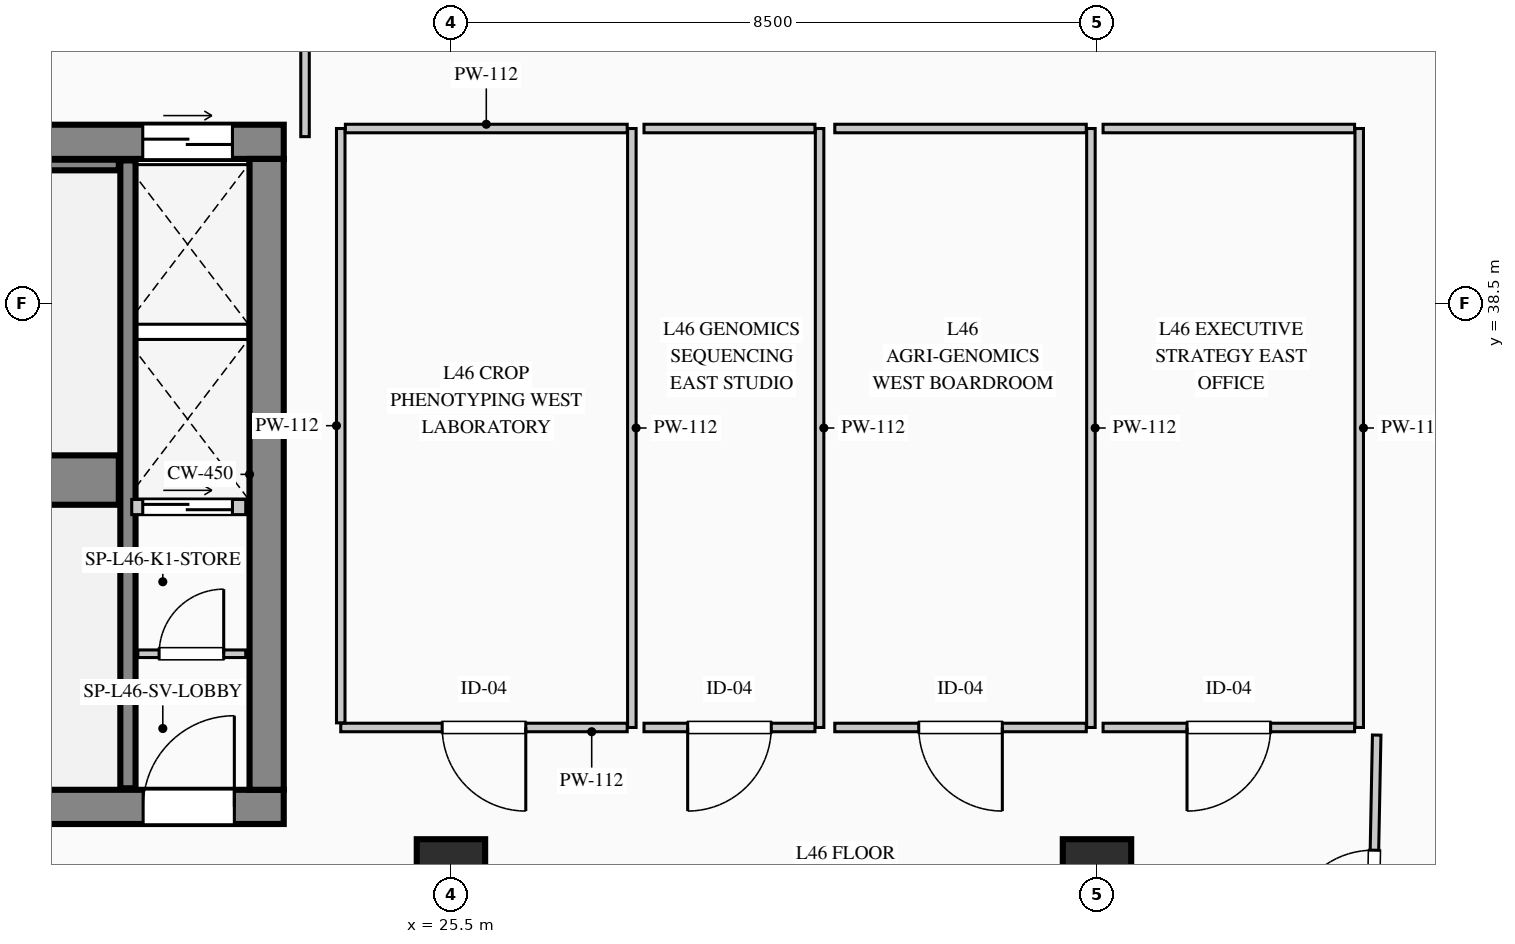
"""IFC4 building model, lengths in metres.
Left out: names, types, materials, properties, quantities, classifications, styles, units other than length and angle.
Written with IfcOpenShell. Run it as: python <this file> out.ifc"""

import sys

from ifc_helpers import new_model, si_unit, direction, frame, frame_2d, origin, origin_2d, place, context, subcontext, project, spatial, rectangle, extrude, element, fill, save


model = new_model("IFC4")
c1 = context("Model", 3, precision=1e-05, world=origin(), true_north=direction((0.0, 1.0)))
c2 = subcontext(c1, "Body", "Model", "MODEL_VIEW")
j1 = project(units=[si_unit("LENGTHUNIT", "METRE"), si_unit("PLANEANGLEUNIT", "RADIAN")], contexts=[c1])
p1 = place(None, origin())
s1 = spatial("IfcSite", under=j1, at=p1, CompositionType="ELEMENT")
p2 = place(p1, origin())
s2 = spatial("IfcBuilding", under=s1, at=p2, CompositionType="ELEMENT")
p3 = place(p2, frame((0.0, 0.0, 195.6)))
s3 = spatial("IfcBuildingStorey", under=s2, at=p3, CompositionType="ELEMENT", Elevation=195.6)
p4 = place(p3, frame((5.55, 40.625, 0.0), z_axis=(0.0, 0.0, 1.0), x_axis=(1.0, 0.0, 0.0)))
e1 = element("IfcWall", 1, at=p4, inside=s3, PredefinedType="SHEAR", context=c2, shape_type="SweptSolid", body=[
    extrude(rectangle(XDim=17.75, YDim=0.45, at=frame_2d((8.875, 0.0))), origin(), (0.0, 0.0, 1.0), 3.95),
])
p5 = place(p4, frame((15.895, 0.0, 0.0)))
e2 = element("IfcOpeningElement", 2, at=p5, cuts=e1, PredefinedType="OPENING", context=c2, shape_type="SweptSolid", body=[
    extrude(rectangle(XDim=1.18, YDim=2.25, at=frame_2d((0.59, 1.125))), frame((0.0, 0.235, 0.0), z_axis=(0.0, -1.0, 0.0), x_axis=(1.0, 0.0, 0.0)), (0.0, 0.0, 1.0), 0.47),
])
p6 = place(p3, frame((5.55, 31.875, 0.0), z_axis=(0.0, 0.0, 1.0), x_axis=(1.0, 0.0, 0.0)))
e3 = element("IfcWall", 3, at=p6, inside=s3, PredefinedType="SHEAR", context=c2, shape_type="SweptSolid", body=[
    extrude(rectangle(XDim=17.75, YDim=0.45, at=frame_2d((8.875, 0.0))), origin(), (0.0, 0.0, 1.0), 3.95),
])
p7 = place(p6, frame((3.1, 0.0, 0.0)))
e4 = element("IfcOpeningElement", 4, at=p7, cuts=e3, PredefinedType="OPENING", context=c2, shape_type="SweptSolid", body=[
    extrude(rectangle(XDim=1.2, YDim=2.2, at=frame_2d((0.6, 1.1))), frame((0.0, 0.235, 0.0), z_axis=(0.0, -1.0, 0.0), x_axis=(1.0, 0.0, 0.0)), (0.0, 0.0, 1.0), 0.47),
])
p8 = place(p6, frame((6.95, 0.0, 0.0)))
e5 = element("IfcOpeningElement", 5, at=p8, cuts=e3, PredefinedType="OPENING", context=c2, shape_type="SweptSolid", body=[
    extrude(rectangle(XDim=1.2, YDim=2.2, at=frame_2d((0.6, 1.1))), frame((0.0, 0.235, 0.0), z_axis=(0.0, -1.0, 0.0), x_axis=(1.0, 0.0, 0.0)), (0.0, 0.0, 1.0), 0.47),
])
p9 = place(p6, frame((8.8, 0.0, 0.0)))
e6 = element("IfcOpeningElement", 6, at=p9, cuts=e3, PredefinedType="OPENING", context=c2, shape_type="SweptSolid", body=[
    extrude(rectangle(XDim=1.15, YDim=2.2, at=frame_2d((0.575, 1.1))), frame((0.0, 0.235, 0.0), z_axis=(0.0, -1.0, 0.0), x_axis=(1.0, 0.0, 0.0)), (0.0, 0.0, 1.0), 0.47),
])
p10 = place(p6, frame((15.9, 0.0, 0.0)))
e7 = element("IfcOpeningElement", 7, at=p10, cuts=e3, PredefinedType="OPENING", context=c2, shape_type="SweptSolid", body=[
    extrude(rectangle(XDim=1.2, YDim=2.2, at=frame_2d((0.6, 1.1))), frame((0.0, 0.235, 0.0), z_axis=(0.0, -1.0, 0.0), x_axis=(1.0, 0.0, 0.0)), (0.0, 0.0, 1.0), 0.47),
])
p11 = place(p3, frame((23.075, 32.1, 0.0), z_axis=(0.0, 0.0, 1.0), x_axis=(0.0, 1.0, 0.0)))
e8 = element("IfcWall", 8, at=p11, inside=s3, PredefinedType="SHEAR", context=c2, shape_type="SweptSolid", body=[
    extrude(rectangle(XDim=8.3, YDim=0.45, at=frame_2d((4.15, 0.0))), origin(), (0.0, 0.0, 1.0), 3.95),
])
p12 = place(p3, frame((14.12, 36.175, 0.0), z_axis=(0.0, 0.0, 1.0), x_axis=(1.0, 0.0, 0.0)))
e9 = element("IfcWall", 9, at=p12, inside=s3, PredefinedType="SHEAR", context=c2, shape_type="SweptSolid", body=[
    extrude(rectangle(XDim=7.01, YDim=0.65, at=frame_2d((3.505, 0.0))), origin(), (0.0, 0.0, 1.0), 3.95),
])
p13 = place(p3, frame((21.25, 32.12, 0.0), z_axis=(0.0, 0.0, 1.0), x_axis=(0.0, 1.0, 0.0)))
e10 = element("IfcWall", 10, at=p13, inside=s3, PredefinedType="SHEAR", context=c2, shape_type="SweptSolid", body=[
    extrude(rectangle(XDim=8.26, YDim=0.2, at=frame_2d((4.13, 0.0))), origin(), (0.0, 0.0, 1.0), 3.95),
])
p14 = place(p3, frame((14.12, 40.32, 0.0), z_axis=(0.0, 0.0, 1.0), x_axis=(1.0, 0.0, 0.0)))
e11 = element("IfcWall", 11, at=p14, inside=s3, PredefinedType="SHEAR", context=c2, shape_type="SweptSolid", body=[
    extrude(rectangle(XDim=7.01, YDim=0.14, at=frame_2d((3.505, 0.0))), origin(), (0.0, 0.0, 1.0), 3.95),
])
for number, where, z_axis, x_axis in (
    (12, (25.5, 31.0, 0.0), (0.0, 0.0, 1.0), (1.0, 0.0, 0.0)),
    (13, (34.0, 31.0, 0.0), (0.0, 0.0, 1.0), (1.0, 0.0, 0.0)),
):
    element("IfcColumn", number, at=place(p3, frame(where, z_axis=z_axis, x_axis=x_axis)), inside=s3, PredefinedType="COLUMN", context=c2, shape_type="SweptSolid", body=[
        extrude(rectangle(XDim=0.9, YDim=0.9, at=origin_2d()), origin(), (0.0, 0.0, 1.0), 3.95),
    ])
p15 = place(p3, frame((21.38, 33.89, 0.0), z_axis=(0.0, 0.0, 1.0), x_axis=(1.0, 0.0, 0.0)))
e14 = element("IfcWall", 14, at=p15, inside=s3, PredefinedType="PARTITIONING", context=c2, shape_type="SweptSolid", body=[
    extrude(rectangle(XDim=1.42, YDim=0.1, at=frame_2d((0.71, 0.0))), origin(), (0.0, 0.0, 1.0), 3.7),
])
p16 = place(p15, frame((0.28, 0.0, 0.0)))
e15 = element("IfcOpeningElement", 15, at=p16, cuts=e14, PredefinedType="OPENING", context=c2, shape_type="SweptSolid", body=[
    extrude(rectangle(XDim=0.85, YDim=2.1, at=frame_2d((0.425, 1.05))), frame((0.0, 0.06, 0.0), z_axis=(0.0, -1.0, 0.0), x_axis=(1.0, 0.0, 0.0)), (0.0, 0.0, 1.0), 0.12),
])
p17 = place(p3, frame((21.3, 35.82, 0.0), z_axis=(0.0, 0.0, 1.0), x_axis=(1.0, 0.0, 0.0)))
e16 = element("IfcWall", 16, at=p17, inside=s3, PredefinedType="PARTITIONING", context=c2, shape_type="SweptSolid", body=[
    extrude(rectangle(XDim=1.5, YDim=0.2, at=frame_2d((0.75, 0.0))), origin(), (0.0, 0.0, 1.0), 3.7),
])
p18 = place(p17, frame((0.145, 0.0, 0.0)))
e17 = element("IfcOpeningElement", 17, at=p18, cuts=e16, PredefinedType="OPENING", context=c2, shape_type="SweptSolid", body=[
    extrude(rectangle(XDim=1.18, YDim=2.25, at=frame_2d((0.59, 1.125))), frame((0.0, 0.11, 0.0), z_axis=(0.0, -1.0, 0.0), x_axis=(1.0, 0.0, 0.0)), (0.0, 0.0, 1.0), 0.22),
])
p19 = place(p3, frame((27.88, 40.8, 0.0), z_axis=(0.0, 0.0, 1.0), x_axis=(0.0, -1.0, 0.0)))
e18 = element("IfcWall", 18, at=p19, inside=s3, PredefinedType="PARTITIONING", context=c2, shape_type="SweptSolid", body=[
    extrude(rectangle(XDim=7.88, YDim=0.112, at=frame_2d((3.94, 0.0))), origin(), (0.0, 0.0, 1.0), 3.7),
])
p20 = place(p3, frame((27.819, 32.92, 0.0), z_axis=(0.0, 0.0, 1.0), x_axis=(-1.0, 0.0, 0.0)))
e19 = element("IfcWall", 19, at=p20, inside=s3, PredefinedType="PARTITIONING", context=c2, shape_type="SweptSolid", body=[
    extrude(rectangle(XDim=3.769, YDim=0.112, at=frame_2d((1.885, 0.0))), origin(), (0.0, 0.0, 1.0), 3.7),
])
p21 = place(p20, frame((1.334, 0.0, 0.0)))
e20 = element("IfcOpeningElement", 20, at=p21, cuts=e19, PredefinedType="OPENING", context=c2, shape_type="SweptSolid", body=[
    extrude(rectangle(XDim=1.1, YDim=2.2, at=frame_2d((0.55, 1.1))), frame((0.0, 0.066, 0.0), z_axis=(0.0, -1.0, 0.0), x_axis=(1.0, 0.0, 0.0)), (0.0, 0.0, 1.0), 0.132),
])
p22 = place(p3, frame((24.05, 32.981, 0.0), z_axis=(0.0, 0.0, 1.0), x_axis=(0.0, 1.0, 0.0)))
e21 = element("IfcWall", 21, at=p22, inside=s3, PredefinedType="PARTITIONING", context=c2, shape_type="SweptSolid", body=[
    extrude(rectangle(XDim=7.819, YDim=0.112, at=frame_2d((3.91, 0.0))), origin(), (0.0, 0.0, 1.0), 3.7),
])
p23 = place(p3, frame((24.111, 40.8, 0.0), z_axis=(0.0, 0.0, 1.0), x_axis=(1.0, 0.0, 0.0)))
e22 = element("IfcWall", 22, at=p23, inside=s3, PredefinedType="PARTITIONING", context=c2, shape_type="SweptSolid", body=[
    extrude(rectangle(XDim=3.708, YDim=0.112, at=frame_2d((1.854, 0.0))), origin(), (0.0, 0.0, 1.0), 3.7),
])
p24 = place(p3, frame((30.35, 40.8, 0.0), z_axis=(0.0, 0.0, 1.0), x_axis=(0.0, -1.0, 0.0)))
e23 = element("IfcWall", 23, at=p24, inside=s3, PredefinedType="PARTITIONING", context=c2, shape_type="SweptSolid", body=[
    extrude(rectangle(XDim=7.88, YDim=0.112, at=frame_2d((3.94, 0.0))), origin(), (0.0, 0.0, 1.0), 3.7),
])
p25 = place(p3, frame((30.289, 32.92, 0.0), z_axis=(0.0, 0.0, 1.0), x_axis=(-1.0, 0.0, 0.0)))
e24 = element("IfcWall", 24, at=p25, inside=s3, PredefinedType="PARTITIONING", context=c2, shape_type="SweptSolid", body=[
    extrude(rectangle(XDim=2.249, YDim=0.112, at=frame_2d((1.125, 0.0))), origin(), (0.0, 0.0, 1.0), 3.7),
])
p26 = place(p25, frame((0.574, 0.0, 0.0)))
e25 = element("IfcOpeningElement", 25, at=p26, cuts=e24, PredefinedType="OPENING", context=c2, shape_type="SweptSolid", body=[
    extrude(rectangle(XDim=1.1, YDim=2.2, at=frame_2d((0.55, 1.1))), frame((0.0, 0.066, 0.0), z_axis=(0.0, -1.0, 0.0), x_axis=(1.0, 0.0, 0.0)), (0.0, 0.0, 1.0), 0.132),
])
p27 = place(p3, frame((28.04, 40.8, 0.0), z_axis=(0.0, 0.0, 1.0), x_axis=(1.0, 0.0, 0.0)))
e26 = element("IfcWall", 26, at=p27, inside=s3, PredefinedType="PARTITIONING", context=c2, shape_type="SweptSolid", body=[
    extrude(rectangle(XDim=2.249, YDim=0.112, at=frame_2d((1.125, 0.0))), origin(), (0.0, 0.0, 1.0), 3.7),
])
p28 = place(p3, frame((33.92, 40.8, 0.0), z_axis=(0.0, 0.0, 1.0), x_axis=(0.0, -1.0, 0.0)))
e27 = element("IfcWall", 27, at=p28, inside=s3, PredefinedType="PARTITIONING", context=c2, shape_type="SweptSolid", body=[
    extrude(rectangle(XDim=7.88, YDim=0.112, at=frame_2d((3.94, 0.0))), origin(), (0.0, 0.0, 1.0), 3.7),
])
p29 = place(p3, frame((33.859, 32.92, 0.0), z_axis=(0.0, 0.0, 1.0), x_axis=(-1.0, 0.0, 0.0)))
e28 = element("IfcWall", 28, at=p29, inside=s3, PredefinedType="PARTITIONING", context=c2, shape_type="SweptSolid", body=[
    extrude(rectangle(XDim=3.309, YDim=0.112, at=frame_2d((1.654, 0.0))), origin(), (0.0, 0.0, 1.0), 3.7),
])
p30 = place(p29, frame((1.104, 0.0, 0.0)))
e29 = element("IfcOpeningElement", 29, at=p30, cuts=e28, PredefinedType="OPENING", context=c2, shape_type="SweptSolid", body=[
    extrude(rectangle(XDim=1.1, YDim=2.2, at=frame_2d((0.55, 1.1))), frame((0.0, 0.066, 0.0), z_axis=(0.0, -1.0, 0.0), x_axis=(1.0, 0.0, 0.0)), (0.0, 0.0, 1.0), 0.132),
])
p31 = place(p3, frame((30.55, 40.8, 0.0), z_axis=(0.0, 0.0, 1.0), x_axis=(1.0, 0.0, 0.0)))
e30 = element("IfcWall", 30, at=p31, inside=s3, PredefinedType="PARTITIONING", context=c2, shape_type="SweptSolid", body=[
    extrude(rectangle(XDim=3.309, YDim=0.112, at=frame_2d((1.654, 0.0))), origin(), (0.0, 0.0, 1.0), 3.7),
])
p32 = place(p3, frame((37.45, 40.8, 0.0), z_axis=(0.0, 0.0, 1.0), x_axis=(0.0, -1.0, 0.0)))
e31 = element("IfcWall", 31, at=p32, inside=s3, PredefinedType="PARTITIONING", context=c2, shape_type="SweptSolid", body=[
    extrude(rectangle(XDim=7.88, YDim=0.112, at=frame_2d((3.94, 0.0))), origin(), (0.0, 0.0, 1.0), 3.7),
])
p33 = place(p3, frame((37.389, 32.92, 0.0), z_axis=(0.0, 0.0, 1.0), x_axis=(-1.0, 0.0, 0.0)))
e32 = element("IfcWall", 32, at=p33, inside=s3, PredefinedType="PARTITIONING", context=c2, shape_type="SweptSolid", body=[
    extrude(rectangle(XDim=3.309, YDim=0.112, at=frame_2d((1.654, 0.0))), origin(), (0.0, 0.0, 1.0), 3.7),
])
p34 = place(p33, frame((1.104, 0.0, 0.0)))
e33 = element("IfcOpeningElement", 33, at=p34, cuts=e32, PredefinedType="OPENING", context=c2, shape_type="SweptSolid", body=[
    extrude(rectangle(XDim=1.1, YDim=2.2, at=frame_2d((0.55, 1.1))), frame((0.0, 0.066, 0.0), z_axis=(0.0, -1.0, 0.0), x_axis=(1.0, 0.0, 0.0)), (0.0, 0.0, 1.0), 0.132),
])
p35 = place(p3, frame((34.08, 40.8, 0.0), z_axis=(0.0, 0.0, 1.0), x_axis=(1.0, 0.0, 0.0)))
e34 = element("IfcWall", 34, at=p35, inside=s3, PredefinedType="PARTITIONING", context=c2, shape_type="SweptSolid", body=[
    extrude(rectangle(XDim=3.309, YDim=0.112, at=frame_2d((1.654, 0.0))), origin(), (0.0, 0.0, 1.0), 3.7),
])
p36 = place(p3, frame((23.58, 40.693, 0.0), z_axis=(0.0, 0.0, 1.0), x_axis=(0.0, 1.0, 0.0)))
e35 = element("IfcWall", 35, at=p36, inside=s3, PredefinedType="PARTITIONING", context=c2, shape_type="SweptSolid", body=[
    extrude(rectangle(XDim=2.542, YDim=0.112, at=frame_2d((1.271, 0.0))), origin(), (0.0, 0.0, 1.0), 3.7),
])
p37 = place(p3, frame((37.599, 28.691, 0.0), z_axis=(0.0, 0.0, 1.0), x_axis=(0.019566997539, 0.999808547977, 0.0)))
e36 = element("IfcWall", 36, at=p37, inside=s3, PredefinedType="PARTITIONING", context=c2, shape_type="SweptSolid", body=[
    extrude(rectangle(XDim=4.13, YDim=0.112, at=frame_2d((2.065, 0.0))), origin(), (0.0, 0.0, 1.0), 3.7),
])
p38 = place(p37, frame((1.515, 0.0, 0.0)))
e37 = element("IfcOpeningElement", 37, at=p38, cuts=e36, PredefinedType="OPENING", context=c2, shape_type="SweptSolid", body=[
    extrude(rectangle(XDim=1.1, YDim=2.2, at=frame_2d((0.55, 1.1))), frame((0.0, 0.066, 0.0), z_axis=(0.0, -1.0, 0.0), x_axis=(1.0, 0.0, 0.0)), (0.0, 0.0, 1.0), 0.132),
])
p39 = place(p10, origin())
e38 = element("IfcDoor", 38, at=p39, inside=s3, OperationType="SINGLE_SWING_RIGHT", PredefinedType="DOOR", context=c2, shape_type="SweptSolid", body=[
    extrude(rectangle(XDim=1.2, YDim=2.2, at=frame_2d((0.6, 1.1))), frame((0.0, 0.025, 0.0), z_axis=(0.0, -1.0, 0.0), x_axis=(1.0, 0.0, 0.0)), (0.0, 0.0, 1.0), 0.05),
])
fill(e7, e38)
p40 = place(p16, origin())
e39 = element("IfcDoor", 39, at=p40, inside=s3, OperationType="SINGLE_SWING_RIGHT", PredefinedType="DOOR", context=c2, shape_type="SweptSolid", body=[
    extrude(rectangle(XDim=0.85, YDim=2.1, at=frame_2d((0.425, 1.05))), frame((0.0, 0.025, 0.0), z_axis=(0.0, -1.0, 0.0), x_axis=(1.0, 0.0, 0.0)), (0.0, 0.0, 1.0), 0.05),
])
fill(e15, e39)
p41 = place(p5, origin())
e40 = element("IfcDoor", 40, at=p41, inside=s3, OperationType="DOUBLE_DOOR_SLIDING", PredefinedType="DOOR", context=c2, shape_type="SweptSolid", body=[
    extrude(rectangle(XDim=1.18, YDim=2.25, at=frame_2d((0.59, 1.125))), frame((0.0, 0.025, 0.0), z_axis=(0.0, -1.0, 0.0), x_axis=(1.0, 0.0, 0.0)), (0.0, 0.0, 1.0), 0.05),
])
fill(e2, e40)
p42 = place(p18, origin())
e41 = element("IfcDoor", 41, at=p42, inside=s3, OperationType="DOUBLE_DOOR_SLIDING", PredefinedType="DOOR", context=c2, shape_type="SweptSolid", body=[
    extrude(rectangle(XDim=1.18, YDim=2.25, at=frame_2d((0.59, 1.125))), frame((0.0, 0.025, 0.0), z_axis=(0.0, -1.0, 0.0), x_axis=(1.0, 0.0, 0.0)), (0.0, 0.0, 1.0), 0.05),
])
fill(e17, e41)
p43 = place(p21, origin())
e42 = element("IfcDoor", 42, at=p43, inside=s3, OperationType="SINGLE_SWING_LEFT", PredefinedType="DOOR", context=c2, shape_type="SweptSolid", body=[
    extrude(rectangle(XDim=1.1, YDim=2.2, at=frame_2d((0.55, 1.1))), frame((0.0, 0.025, 0.0), z_axis=(0.0, -1.0, 0.0), x_axis=(1.0, 0.0, 0.0)), (0.0, 0.0, 1.0), 0.05),
])
fill(e20, e42)
p44 = place(p26, origin())
e43 = element("IfcDoor", 43, at=p44, inside=s3, OperationType="SINGLE_SWING_RIGHT", PredefinedType="DOOR", context=c2, shape_type="SweptSolid", body=[
    extrude(rectangle(XDim=1.1, YDim=2.2, at=frame_2d((0.55, 1.1))), frame((0.0, 0.025, 0.0), z_axis=(0.0, -1.0, 0.0), x_axis=(1.0, 0.0, 0.0)), (0.0, 0.0, 1.0), 0.05),
])
fill(e25, e43)
p45 = place(p30, origin())
e44 = element("IfcDoor", 44, at=p45, inside=s3, OperationType="SINGLE_SWING_LEFT", PredefinedType="DOOR", context=c2, shape_type="SweptSolid", body=[
    extrude(rectangle(XDim=1.1, YDim=2.2, at=frame_2d((0.55, 1.1))), frame((0.0, 0.025, 0.0), z_axis=(0.0, -1.0, 0.0), x_axis=(1.0, 0.0, 0.0)), (0.0, 0.0, 1.0), 0.05),
])
fill(e29, e44)
p46 = place(p34, origin())
e45 = element("IfcDoor", 45, at=p46, inside=s3, OperationType="SINGLE_SWING_RIGHT", PredefinedType="DOOR", context=c2, shape_type="SweptSolid", body=[
    extrude(rectangle(XDim=1.1, YDim=2.2, at=frame_2d((0.55, 1.1))), frame((0.0, 0.025, 0.0), z_axis=(0.0, -1.0, 0.0), x_axis=(1.0, 0.0, 0.0)), (0.0, 0.0, 1.0), 0.05),
])
fill(e33, e45)
p47 = place(p38, origin())
e46 = element("IfcDoor", 46, at=p47, inside=s3, OperationType="SINGLE_SWING_LEFT", PredefinedType="DOOR", context=c2, shape_type="SweptSolid", body=[
    extrude(rectangle(XDim=1.1, YDim=2.2, at=frame_2d((0.55, 1.1))), frame((0.0, 0.025, 0.0), z_axis=(0.0, -1.0, 0.0), x_axis=(1.0, 0.0, 0.0)), (0.0, 0.0, 1.0), 0.05),
])
fill(e37, e46)
save(model, sys.argv[1])
